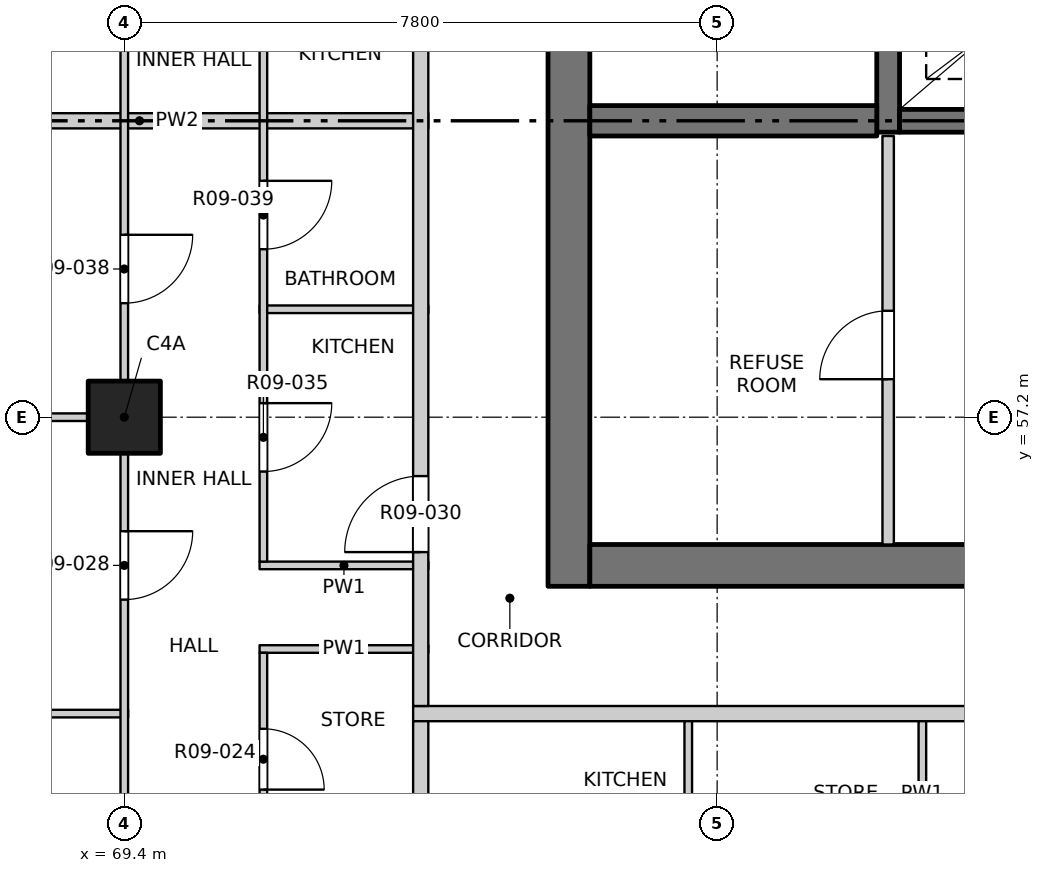
"""IFC4 building model, lengths in metres.
Left out: names, types, materials, properties, quantities, classifications, styles, units other than length and angle.
Written with IfcOpenShell. Run it as: python <this file> out.ifc"""

import sys

from ifc_helpers import new_model, si_unit, direction, frame, frame_2d, origin, origin_2d, place, context, subcontext, project, spatial, rectangle, extrude, element, fill, save


model = new_model("IFC4")
c1 = context("Model", 3, precision=1e-05, world=origin(), true_north=direction((0.0, 1.0)))
c2 = subcontext(c1, "Body", "Model", "MODEL_VIEW")
j1 = project(units=[si_unit("LENGTHUNIT", "METRE"), si_unit("PLANEANGLEUNIT", "RADIAN")], contexts=[c1])
p1 = place(None, origin())
s1 = spatial("IfcSite", under=j1, at=p1, CompositionType="ELEMENT")
p2 = place(p1, origin())
s2 = spatial("IfcBuilding", under=s1, at=p2, CompositionType="ELEMENT")
p3 = place(p2, frame((0.0, 0.0, 110.1)))
s3 = spatial("IfcBuildingStorey", under=s2, at=p3, CompositionType="ELEMENT", Elevation=110.1)
p4 = place(p3, frame((69.4, 57.2, -0.25), z_axis=(0.0, 0.0, 1.0), x_axis=(1.0, 0.0, 0.0)))
e1 = element("IfcColumn", 1, at=p4, inside=s3, PredefinedType="COLUMN", context=c2, shape_type="SweptSolid", body=[
    extrude(rectangle(XDim=0.95, YDim=0.95, at=origin_2d()), origin(), (0.0, 0.0, 1.0), 3.4),
])
p5 = place(p3, frame((75.25, 54.975, -0.25), z_axis=(0.0, 0.0, 1.0), x_axis=(0.0, 1.0, 0.0)))
e2 = element("IfcWall", 2, at=p5, inside=s3, PredefinedType="SOLIDWALL", context=c2, shape_type="SweptSolid", body=[
    extrude(rectangle(XDim=22.325, YDim=0.55, at=frame_2d((11.163, 0.0))), origin(), (0.0, 0.0, 1.0), 3.4),
])
p6 = place(p5, frame((7.475, 0.0, 0.25)))
e3 = element("IfcOpeningElement", 3, at=p6, cuts=e2, PredefinedType="OPENING", context=c2, shape_type="SweptSolid", body=[
    extrude(rectangle(XDim=0.9, YDim=2.1, at=frame_2d((0.45, 1.05))), frame((0.0, 0.285, 0.0), z_axis=(0.0, -1.0, 0.0), x_axis=(1.0, 0.0, 0.0)), (0.0, 0.0, 1.0), 0.57),
])
p7 = place(p5, frame((10.775, 0.0, 0.25)))
e4 = element("IfcOpeningElement", 4, at=p7, cuts=e2, PredefinedType="OPENING", context=c2, shape_type="SweptSolid", body=[
    extrude(rectangle(XDim=0.9, YDim=2.1, at=frame_2d((0.45, 1.05))), frame((0.0, 0.285, 0.0), z_axis=(0.0, -1.0, 0.0), x_axis=(1.0, 0.0, 0.0)), (0.0, 0.0, 1.0), 0.57),
])
p8 = place(p5, frame((15.275, 0.0, 0.25)))
e5 = element("IfcOpeningElement", 5, at=p8, cuts=e2, PredefinedType="OPENING", context=c2, shape_type="SweptSolid", body=[
    extrude(rectangle(XDim=0.9, YDim=2.1, at=frame_2d((0.45, 1.05))), frame((0.0, 0.285, 0.0), z_axis=(0.0, -1.0, 0.0), x_axis=(1.0, 0.0, 0.0)), (0.0, 0.0, 1.0), 0.57),
])
p9 = place(p5, frame((20.075, 0.0, 0.25)))
e6 = element("IfcOpeningElement", 6, at=p9, cuts=e2, PredefinedType="OPENING", context=c2, shape_type="SweptSolid", body=[
    extrude(rectangle(XDim=0.9, YDim=2.1, at=frame_2d((0.45, 1.05))), frame((0.0, 0.285, 0.0), z_axis=(0.0, -1.0, 0.0), x_axis=(1.0, 0.0, 0.0)), (0.0, 0.0, 1.0), 0.57),
])
p10 = place(p3, frame((75.525, 55.25, -0.25), z_axis=(0.0, 0.0, 1.0), x_axis=(1.0, 0.0, 0.0)))
e7 = element("IfcWall", 7, at=p10, inside=s3, PredefinedType="SOLIDWALL", context=c2, shape_type="SweptSolid", body=[
    extrude(rectangle(XDim=18.95, YDim=0.55, at=frame_2d((9.475, 0.0))), origin(), (0.0, 0.0, 1.0), 3.4),
])
p11 = place(p10, frame((8.725, 0.0, 0.25)))
e8 = element("IfcOpeningElement", 8, at=p11, cuts=e7, PredefinedType="OPENING", context=c2, shape_type="SweptSolid", body=[
    extrude(rectangle(XDim=1.5, YDim=2.1, at=frame_2d((0.75, 1.05))), frame((0.0, 0.285, 0.0), z_axis=(0.0, -1.0, 0.0), x_axis=(1.0, 0.0, 0.0)), (0.0, 0.0, 1.0), 0.57),
])
p12 = place(p3, frame((79.45, 60.95, -0.25), z_axis=(0.0, 0.0, 1.0), x_axis=(0.0, 1.0, 0.0)))
e9 = element("IfcWall", 9, at=p12, inside=s3, PredefinedType="SOLIDWALL", context=c2, shape_type="SweptSolid", body=[
    extrude(rectangle(XDim=16.35, YDim=0.3, at=frame_2d((8.175, 0.0))), origin(), (0.0, 0.0, 1.0), 3.4),
])
p13 = place(p3, frame((79.6, 61.1, -0.25), z_axis=(0.0, 0.0, 1.0), x_axis=(1.0, 0.0, 0.0)))
e10 = element("IfcWall", 10, at=p13, inside=s3, PredefinedType="SOLIDWALL", context=c2, shape_type="SweptSolid", body=[
    extrude(rectangle(XDim=3.0, YDim=0.3, at=frame_2d((1.5, 0.0))), origin(), (0.0, 0.0, 1.0), 3.4),
])
p14 = place(p3, frame((75.525, 61.1, -0.25), z_axis=(0.0, 0.0, 1.0), x_axis=(1.0, 0.0, 0.0)))
e11 = element("IfcWall", 11, at=p14, inside=s3, PredefinedType="SOLIDWALL", context=c2, shape_type="SweptSolid", body=[
    extrude(rectangle(XDim=3.775, YDim=0.4, at=frame_2d((1.888, 0.0))), origin(), (0.0, 0.0, 1.0), 3.4),
])
p15 = place(p3, frame((65.8, 53.3, 0.0), z_axis=(0.0, 0.0, 1.0), x_axis=(1.0, 0.0, 0.0)))
e12 = element("IfcWall", 12, at=p15, inside=s3, PredefinedType="PARTITIONING", context=c2, shape_type="SweptSolid", body=[
    extrude(rectangle(XDim=3.65, YDim=0.1, at=frame_2d((1.825, 0.0))), origin(), (0.0, 0.0, 1.0), 3.15),
])
p16 = place(p3, frame((73.2, 53.3, 0.0), z_axis=(0.0, 0.0, 1.0), x_axis=(1.0, 0.0, 0.0)))
e13 = element("IfcWall", 13, at=p16, inside=s3, PredefinedType="PARTITIONING", context=c2, shape_type="SweptSolid", body=[
    extrude(rectangle(XDim=23.6, YDim=0.2, at=frame_2d((11.8, 0.0))), origin(), (0.0, 0.0, 1.0), 3.15),
])
p17 = place(p16, frame((10.375, 0.0, 0.0)))
e14 = element("IfcOpeningElement", 14, at=p17, cuts=e13, PredefinedType="OPENING", context=c2, shape_type="SweptSolid", body=[
    extrude(rectangle(XDim=1.0, YDim=2.1, at=frame_2d((0.5, 1.05))), frame((0.0, 0.11, 0.0), z_axis=(0.0, -1.0, 0.0), x_axis=(1.0, 0.0, 0.0)), (0.0, 0.0, 1.0), 0.22),
])
p18 = place(p16, frame((22.075, 0.0, 0.0)))
e15 = element("IfcOpeningElement", 15, at=p18, cuts=e13, PredefinedType="OPENING", context=c2, shape_type="SweptSolid", body=[
    extrude(rectangle(XDim=1.0, YDim=2.1, at=frame_2d((0.5, 1.05))), frame((0.0, 0.11, 0.0), z_axis=(0.0, -1.0, 0.0), x_axis=(1.0, 0.0, 0.0)), (0.0, 0.0, 1.0), 0.22),
])
for number, where, z_axis, x_axis in (
    (16, (71.18, 54.15, 0.0), (0.0, 0.0, 1.0), (1.0, 0.0, 0.0)),
    (17, (71.18, 55.25, 0.0), (0.0, 0.0, 1.0), (1.0, 0.0, 0.0)),
):
    element("IfcWall", number, at=place(p3, frame(where, z_axis=z_axis, x_axis=x_axis)), inside=s3, PredefinedType="PARTITIONING", context=c2, shape_type="SweptSolid", body=[
        extrude(rectangle(XDim=2.22, YDim=0.1, at=frame_2d((1.11, 0.0))), origin(), (0.0, 0.0, 1.0), 3.15),
    ])
p19 = place(p3, frame((65.8, 57.2, 0.0), z_axis=(0.0, 0.0, 1.0), x_axis=(1.0, 0.0, 0.0)))
e18 = element("IfcWall", 18, at=p19, inside=s3, PredefinedType="PARTITIONING", context=c2, shape_type="SweptSolid", body=[
    extrude(rectangle(XDim=3.65, YDim=0.1, at=frame_2d((1.825, 0.0))), origin(), (0.0, 0.0, 1.0), 3.15),
])
p20 = place(p3, frame((71.18, 58.62, 0.0), z_axis=(0.0, 0.0, 1.0), x_axis=(1.0, 0.0, 0.0)))
e19 = element("IfcWall", 19, at=p20, inside=s3, PredefinedType="PARTITIONING", context=c2, shape_type="SweptSolid", body=[
    extrude(rectangle(XDim=2.22, YDim=0.1, at=frame_2d((1.11, 0.0))), origin(), (0.0, 0.0, 1.0), 3.15),
])
p21 = place(p3, frame((65.8, 61.1, 0.0), z_axis=(0.0, 0.0, 1.0), x_axis=(1.0, 0.0, 0.0)))
e20 = element("IfcWall", 20, at=p21, inside=s3, PredefinedType="PARTITIONING", context=c2, shape_type="SweptSolid", body=[
    extrude(rectangle(XDim=7.6, YDim=0.2, at=frame_2d((3.8, 0.0))), origin(), (0.0, 0.0, 1.0), 2.55),
])
p22 = place(p3, frame((69.4, 45.8, 0.0), z_axis=(0.0, 0.0, 1.0), x_axis=(0.0, 1.0, 0.0)))
e21 = element("IfcWall", 21, at=p22, inside=s3, PredefinedType="PARTITIONING", context=c2, shape_type="SweptSolid", body=[
    extrude(rectangle(XDim=38.4, YDim=0.1, at=frame_2d((19.2, 0.0))), origin(), (0.0, 0.0, 1.0), 3.15),
])
p23 = place(p22, frame((1.05, 0.0, 0.0)))
e22 = element("IfcOpeningElement", 22, at=p23, cuts=e21, PredefinedType="OPENING", context=c2, shape_type="SweptSolid", body=[
    extrude(rectangle(XDim=1.2, YDim=2.1, at=frame_2d((0.6, 1.05))), frame((0.0, 0.06, 0.0), z_axis=(0.0, -1.0, 0.0), x_axis=(1.0, 0.0, 0.0)), (0.0, 0.0, 1.0), 0.12),
])
p24 = place(p22, frame((5.1, 0.0, 0.0)))
e23 = element("IfcOpeningElement", 23, at=p24, cuts=e21, PredefinedType="OPENING", context=c2, shape_type="SweptSolid", body=[
    extrude(rectangle(XDim=0.9, YDim=2.1, at=frame_2d((0.45, 1.05))), frame((0.0, 0.06, 0.0), z_axis=(0.0, -1.0, 0.0), x_axis=(1.0, 0.0, 0.0)), (0.0, 0.0, 1.0), 0.12),
])
p25 = place(p22, frame((9.0, 0.0, 0.0)))
e24 = element("IfcOpeningElement", 24, at=p25, cuts=e21, PredefinedType="OPENING", context=c2, shape_type="SweptSolid", body=[
    extrude(rectangle(XDim=0.9, YDim=2.1, at=frame_2d((0.45, 1.05))), frame((0.0, 0.06, 0.0), z_axis=(0.0, -1.0, 0.0), x_axis=(1.0, 0.0, 0.0)), (0.0, 0.0, 1.0), 0.12),
])
p26 = place(p22, frame((12.9, 0.0, 0.0)))
e25 = element("IfcOpeningElement", 25, at=p26, cuts=e21, PredefinedType="OPENING", context=c2, shape_type="SweptSolid", body=[
    extrude(rectangle(XDim=0.9, YDim=2.1, at=frame_2d((0.45, 1.05))), frame((0.0, 0.06, 0.0), z_axis=(0.0, -1.0, 0.0), x_axis=(1.0, 0.0, 0.0)), (0.0, 0.0, 1.0), 0.12),
])
p27 = place(p22, frame((16.8, 0.0, 0.0)))
e26 = element("IfcOpeningElement", 26, at=p27, cuts=e21, PredefinedType="OPENING", context=c2, shape_type="SweptSolid", body=[
    extrude(rectangle(XDim=0.9, YDim=2.1, at=frame_2d((0.45, 1.05))), frame((0.0, 0.06, 0.0), z_axis=(0.0, -1.0, 0.0), x_axis=(1.0, 0.0, 0.0)), (0.0, 0.0, 1.0), 0.12),
])
p28 = place(p22, frame((20.7, 0.0, 0.0)))
e27 = element("IfcOpeningElement", 27, at=p28, cuts=e21, PredefinedType="OPENING", context=c2, shape_type="SweptSolid", body=[
    extrude(rectangle(XDim=0.9, YDim=2.1, at=frame_2d((0.45, 1.05))), frame((0.0, 0.06, 0.0), z_axis=(0.0, -1.0, 0.0), x_axis=(1.0, 0.0, 0.0)), (0.0, 0.0, 1.0), 0.12),
])
p29 = place(p22, frame((24.6, 0.0, 0.0)))
e28 = element("IfcOpeningElement", 28, at=p29, cuts=e21, PredefinedType="OPENING", context=c2, shape_type="SweptSolid", body=[
    extrude(rectangle(XDim=0.9, YDim=2.1, at=frame_2d((0.45, 1.05))), frame((0.0, 0.06, 0.0), z_axis=(0.0, -1.0, 0.0), x_axis=(1.0, 0.0, 0.0)), (0.0, 0.0, 1.0), 0.12),
])
p30 = place(p22, frame((28.5, 0.0, 0.0)))
e29 = element("IfcOpeningElement", 29, at=p30, cuts=e21, PredefinedType="OPENING", context=c2, shape_type="SweptSolid", body=[
    extrude(rectangle(XDim=0.9, YDim=2.1, at=frame_2d((0.45, 1.05))), frame((0.0, 0.06, 0.0), z_axis=(0.0, -1.0, 0.0), x_axis=(1.0, 0.0, 0.0)), (0.0, 0.0, 1.0), 0.12),
])
p31 = place(p22, frame((32.4, 0.0, 0.0)))
e30 = element("IfcOpeningElement", 30, at=p31, cuts=e21, PredefinedType="OPENING", context=c2, shape_type="SweptSolid", body=[
    extrude(rectangle(XDim=0.9, YDim=2.1, at=frame_2d((0.45, 1.05))), frame((0.0, 0.06, 0.0), z_axis=(0.0, -1.0, 0.0), x_axis=(1.0, 0.0, 0.0)), (0.0, 0.0, 1.0), 0.12),
])
p32 = place(p22, frame((36.15, 0.0, 0.0)))
e31 = element("IfcOpeningElement", 31, at=p32, cuts=e21, PredefinedType="OPENING", context=c2, shape_type="SweptSolid", body=[
    extrude(rectangle(XDim=1.2, YDim=2.1, at=frame_2d((0.6, 1.05))), frame((0.0, 0.06, 0.0), z_axis=(0.0, -1.0, 0.0), x_axis=(1.0, 0.0, 0.0)), (0.0, 0.0, 1.0), 0.12),
])
p33 = place(p3, frame((71.23, 49.45, 0.0), z_axis=(0.0, 0.0, 1.0), x_axis=(0.0, 1.0, 0.0)))
e32 = element("IfcWall", 32, at=p33, inside=s3, PredefinedType="PARTITIONING", context=c2, shape_type="SweptSolid", body=[
    extrude(rectangle(XDim=4.65, YDim=0.1, at=frame_2d((2.325, 0.0))), origin(), (0.0, 0.0, 1.0), 3.15),
])
p34 = place(p33, frame((0.425, 0.0, 0.0)))
e33 = element("IfcOpeningElement", 33, at=p34, cuts=e32, PredefinedType="OPENING", context=c2, shape_type="SweptSolid", body=[
    extrude(rectangle(XDim=0.9, YDim=2.1, at=frame_2d((0.45, 1.05))), frame((0.0, 0.06, 0.0), z_axis=(0.0, -1.0, 0.0), x_axis=(1.0, 0.0, 0.0)), (0.0, 0.0, 1.0), 0.12),
])
p35 = place(p33, frame((2.85, 0.0, 0.0)))
e34 = element("IfcOpeningElement", 34, at=p35, cuts=e32, PredefinedType="OPENING", context=c2, shape_type="SweptSolid", body=[
    extrude(rectangle(XDim=0.8, YDim=2.1, at=frame_2d((0.4, 1.05))), frame((0.0, 0.06, 0.0), z_axis=(0.0, -1.0, 0.0), x_axis=(1.0, 0.0, 0.0)), (0.0, 0.0, 1.0), 0.12),
])
p36 = place(p3, frame((71.23, 55.3, 0.0), z_axis=(0.0, 0.0, 1.0), x_axis=(0.0, 1.0, 0.0)))
e35 = element("IfcWall", 35, at=p36, inside=s3, PredefinedType="PARTITIONING", context=c2, shape_type="SweptSolid", body=[
    extrude(rectangle(XDim=11.65, YDim=0.1, at=frame_2d((5.825, 0.0))), origin(), (0.0, 0.0, 1.0), 3.15),
])
p37 = place(p36, frame((1.185, 0.0, 0.0)))
e36 = element("IfcOpeningElement", 36, at=p37, cuts=e35, PredefinedType="OPENING", context=c2, shape_type="SweptSolid", body=[
    extrude(rectangle(XDim=0.9, YDim=2.1, at=frame_2d((0.45, 1.05))), frame((0.0, 0.06, 0.0), z_axis=(0.0, -1.0, 0.0), x_axis=(1.0, 0.0, 0.0)), (0.0, 0.0, 1.0), 0.12),
])
p38 = place(p36, frame((4.11, 0.0, 0.0)))
e37 = element("IfcOpeningElement", 37, at=p38, cuts=e35, PredefinedType="OPENING", context=c2, shape_type="SweptSolid", body=[
    extrude(rectangle(XDim=0.9, YDim=2.1, at=frame_2d((0.45, 1.05))), frame((0.0, 0.06, 0.0), z_axis=(0.0, -1.0, 0.0), x_axis=(1.0, 0.0, 0.0)), (0.0, 0.0, 1.0), 0.12),
])
p39 = place(p36, frame((7.1, 0.0, 0.0)))
e38 = element("IfcOpeningElement", 38, at=p39, cuts=e35, PredefinedType="OPENING", context=c2, shape_type="SweptSolid", body=[
    extrude(rectangle(XDim=0.9, YDim=2.1, at=frame_2d((0.45, 1.05))), frame((0.0, 0.06, 0.0), z_axis=(0.0, -1.0, 0.0), x_axis=(1.0, 0.0, 0.0)), (0.0, 0.0, 1.0), 0.12),
])
p40 = place(p36, frame((10.05, 0.0, 0.0)))
e39 = element("IfcOpeningElement", 39, at=p40, cuts=e35, PredefinedType="OPENING", context=c2, shape_type="SweptSolid", body=[
    extrude(rectangle(XDim=0.9, YDim=2.1, at=frame_2d((0.45, 1.05))), frame((0.0, 0.06, 0.0), z_axis=(0.0, -1.0, 0.0), x_axis=(1.0, 0.0, 0.0)), (0.0, 0.0, 1.0), 0.12),
])
p41 = place(p3, frame((73.3, 45.8, 0.0), z_axis=(0.0, 0.0, 1.0), x_axis=(0.0, 1.0, 0.0)))
e40 = element("IfcWall", 40, at=p41, inside=s3, PredefinedType="PARTITIONING", context=c2, shape_type="SweptSolid", body=[
    extrude(rectangle(XDim=7.4, YDim=0.2, at=frame_2d((3.7, 0.0))), origin(), (0.0, 0.0, 1.0), 3.15),
])
p42 = place(p3, frame((73.3, 53.4, 0.0), z_axis=(0.0, 0.0, 1.0), x_axis=(0.0, 1.0, 0.0)))
e41 = element("IfcWall", 41, at=p42, inside=s3, PredefinedType="PARTITIONING", context=c2, shape_type="SweptSolid", body=[
    extrude(rectangle(XDim=30.8, YDim=0.2, at=frame_2d((15.4, 0.0))), origin(), (0.0, 0.0, 1.0), 3.15),
])
p43 = place(p42, frame((2.025, 0.0, 0.0)))
e42 = element("IfcOpeningElement", 42, at=p43, cuts=e41, PredefinedType="OPENING", context=c2, shape_type="SweptSolid", body=[
    extrude(rectangle(XDim=1.0, YDim=2.1, at=frame_2d((0.5, 1.05))), frame((0.0, 0.11, 0.0), z_axis=(0.0, -1.0, 0.0), x_axis=(1.0, 0.0, 0.0)), (0.0, 0.0, 1.0), 0.22),
])
p44 = place(p42, frame((14.875, 0.0, 0.0)))
e43 = element("IfcOpeningElement", 43, at=p44, cuts=e41, PredefinedType="OPENING", context=c2, shape_type="SweptSolid", body=[
    extrude(rectangle(XDim=1.0, YDim=2.1, at=frame_2d((0.5, 1.05))), frame((0.0, 0.11, 0.0), z_axis=(0.0, -1.0, 0.0), x_axis=(1.0, 0.0, 0.0)), (0.0, 0.0, 1.0), 0.22),
])
p45 = place(p42, frame((25.225, 0.0, 0.0)))
e44 = element("IfcOpeningElement", 44, at=p45, cuts=e41, PredefinedType="OPENING", context=c2, shape_type="SweptSolid", body=[
    extrude(rectangle(XDim=1.0, YDim=2.1, at=frame_2d((0.5, 1.05))), frame((0.0, 0.11, 0.0), z_axis=(0.0, -1.0, 0.0), x_axis=(1.0, 0.0, 0.0)), (0.0, 0.0, 1.0), 0.22),
])
p46 = place(p3, frame((76.82, 51.28, 0.0), z_axis=(0.0, 0.0, 1.0), x_axis=(0.0, 1.0, 0.0)))
e45 = element("IfcWall", 45, at=p46, inside=s3, PredefinedType="PARTITIONING", context=c2, shape_type="SweptSolid", body=[
    extrude(rectangle(XDim=1.92, YDim=0.1, at=frame_2d((0.96, 0.0))), origin(), (0.0, 0.0, 1.0), 3.15),
])
p47 = place(p3, frame((79.45, 55.525, 0.0), z_axis=(0.0, 0.0, 1.0), x_axis=(0.0, 1.0, 0.0)))
e46 = element("IfcWall", 46, at=p47, inside=s3, PredefinedType="PARTITIONING", context=c2, shape_type="SweptSolid", body=[
    extrude(rectangle(XDim=5.375, YDim=0.15, at=frame_2d((2.688, 0.0))), origin(), (0.0, 0.0, 1.0), 3.15),
])
p48 = place(p47, frame((2.175, 0.0, 0.0)))
e47 = element("IfcOpeningElement", 47, at=p48, cuts=e46, PredefinedType="OPENING", context=c2, shape_type="SweptSolid", body=[
    extrude(rectangle(XDim=0.9, YDim=2.1, at=frame_2d((0.45, 1.05))), frame((0.0, 0.085, 0.0), z_axis=(0.0, -1.0, 0.0), x_axis=(1.0, 0.0, 0.0)), (0.0, 0.0, 1.0), 0.17),
])
p49 = place(p3, frame((79.9, 51.28, 0.0), z_axis=(0.0, 0.0, 1.0), x_axis=(0.0, 1.0, 0.0)))
e48 = element("IfcWall", 48, at=p49, inside=s3, PredefinedType="PARTITIONING", context=c2, shape_type="SweptSolid", body=[
    extrude(rectangle(XDim=1.92, YDim=0.1, at=frame_2d((0.96, 0.0))), origin(), (0.0, 0.0, 1.0), 3.15),
])
p50 = place(p35, origin())
e49 = element("IfcDoor", 49, at=p50, inside=s3, OperationType="SINGLE_SWING_RIGHT", PredefinedType="DOOR", context=c2, shape_type="SweptSolid", body=[
    extrude(rectangle(XDim=0.8, YDim=2.1, at=frame_2d((0.4, 1.05))), frame((0.0, 0.025, 0.0), z_axis=(0.0, -1.0, 0.0), x_axis=(1.0, 0.0, 0.0)), (0.0, 0.0, 1.0), 0.05),
])
fill(e34, e49)
p51 = place(p25, origin())
e50 = element("IfcDoor", 50, at=p51, inside=s3, OperationType="SINGLE_SWING_LEFT", PredefinedType="DOOR", context=c2, shape_type="SweptSolid", body=[
    extrude(rectangle(XDim=0.9, YDim=2.1, at=frame_2d((0.45, 1.05))), frame((0.0, 0.025, 0.0), z_axis=(0.0, -1.0, 0.0), x_axis=(1.0, 0.0, 0.0)), (0.0, 0.0, 1.0), 0.05),
])
fill(e24, e50)
p52 = place(p43, origin())
e51 = element("IfcDoor", 51, at=p52, inside=s3, OperationType="SINGLE_SWING_RIGHT", PredefinedType="DOOR", context=c2, shape_type="SweptSolid", body=[
    extrude(rectangle(XDim=1.0, YDim=2.1, at=frame_2d((0.5, 1.05))), frame((0.0, 0.025, 0.0), z_axis=(0.0, -1.0, 0.0), x_axis=(1.0, 0.0, 0.0)), (0.0, 0.0, 1.0), 0.05),
])
fill(e42, e51)
p53 = place(p37, origin())
e52 = element("IfcDoor", 52, at=p53, inside=s3, OperationType="SINGLE_SWING_LEFT", PredefinedType="DOOR", context=c2, shape_type="SweptSolid", body=[
    extrude(rectangle(XDim=0.9, YDim=2.1, at=frame_2d((0.45, 1.05))), frame((0.0, 0.025, 0.0), z_axis=(0.0, -1.0, 0.0), x_axis=(1.0, 0.0, 0.0)), (0.0, 0.0, 1.0), 0.05),
])
fill(e36, e52)
p54 = place(p48, origin())
e53 = element("IfcDoor", 53, at=p54, inside=s3, OperationType="SINGLE_SWING_LEFT", PredefinedType="DOOR", context=c2, shape_type="SweptSolid", body=[
    extrude(rectangle(XDim=0.9, YDim=2.1, at=frame_2d((0.45, 1.05))), frame((0.0, 0.025, 0.0), z_axis=(0.0, -1.0, 0.0), x_axis=(1.0, 0.0, 0.0)), (0.0, 0.0, 1.0), 0.05),
])
fill(e47, e53)
p55 = place(p26, origin())
e54 = element("IfcDoor", 54, at=p55, inside=s3, OperationType="SINGLE_SWING_LEFT", PredefinedType="DOOR", context=c2, shape_type="SweptSolid", body=[
    extrude(rectangle(XDim=0.9, YDim=2.1, at=frame_2d((0.45, 1.05))), frame((0.0, 0.025, 0.0), z_axis=(0.0, -1.0, 0.0), x_axis=(1.0, 0.0, 0.0)), (0.0, 0.0, 1.0), 0.05),
])
fill(e25, e54)
p56 = place(p38, origin())
e55 = element("IfcDoor", 55, at=p56, inside=s3, OperationType="SINGLE_SWING_LEFT", PredefinedType="DOOR", context=c2, shape_type="SweptSolid", body=[
    extrude(rectangle(XDim=0.9, YDim=2.1, at=frame_2d((0.45, 1.05))), frame((0.0, 0.025, 0.0), z_axis=(0.0, -1.0, 0.0), x_axis=(1.0, 0.0, 0.0)), (0.0, 0.0, 1.0), 0.05),
])
fill(e37, e55)
save(model, sys.argv[1])
